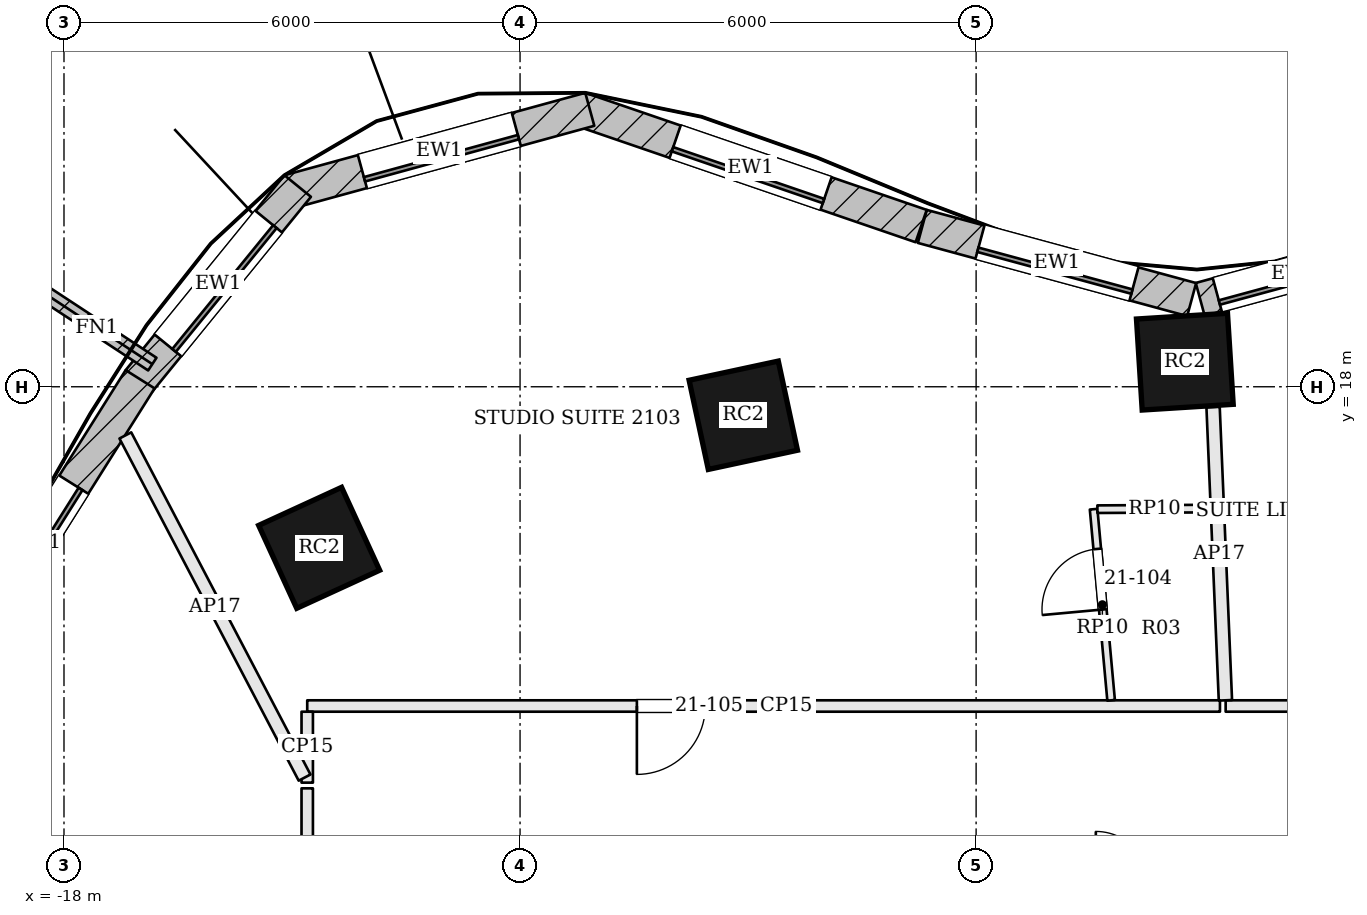
"""IFC4 building model, lengths in metres.
Left out: names, types, materials, properties, quantities, classifications, styles, units other than length and angle.
Written with IfcOpenShell. Run it as: python <this file> out.ifc"""

import sys

from ifc_helpers import new_model, si_unit, direction, frame, frame_2d, origin, origin_2d, place, context, subcontext, project, spatial, rectangle, extrude, element, fill, save


model = new_model("IFC4")
c1 = context("Model", 3, precision=1e-05, world=origin(), true_north=direction((0.0, 1.0)))
c2 = subcontext(c1, "Body", "Model", "MODEL_VIEW")
j1 = project(units=[si_unit("LENGTHUNIT", "METRE"), si_unit("PLANEANGLEUNIT", "RADIAN")], contexts=[c1])
p1 = place(None, origin())
s1 = spatial("IfcSite", under=j1, at=p1, CompositionType="ELEMENT")
p2 = place(p1, origin())
s2 = spatial("IfcBuilding", under=s1, at=p2, CompositionType="ELEMENT")
p3 = place(p2, frame((0.0, 0.0, 92.4)))
s3 = spatial("IfcBuildingStorey", under=s2, at=p3, CompositionType="ELEMENT", Elevation=92.4)
for number, where, z_axis, x_axis in (
    (1, (-3.254, 18.33, 0.0), (0.0, 0.0, 1.0), (-0.998, -0.063, 0.0)),
    (2, (-9.063, 17.625, 0.0), (0.0, 0.0, 1.0), (-0.978, -0.21, 0.0)),
    (3, (-14.643, 15.881, 0.0), (0.0, 0.0, 1.0), (-0.909, -0.417, 0.0)),
):
    element("IfcColumn", number, at=place(p3, frame(where, z_axis=z_axis, x_axis=x_axis)), inside=s3, PredefinedType="COLUMN", context=c2, shape_type="SweptSolid", body=[
        extrude(rectangle(XDim=1.2, YDim=1.2, at=origin_2d()), origin(), (0.0, 0.0, 1.0), 3.6),
    ])
p4 = place(p3, frame((-0.576, 19.821, 0.0), z_axis=(0.0, 0.0, 1.0), x_axis=(-0.965009398019, -0.262215296532, 0.0)))
e4 = element("IfcWall", 4, at=p4, inside=s3, PredefinedType="SOLIDWALL", context=c2, shape_type="SweptSolid", body=[
    extrude(rectangle(XDim=2.565, YDim=0.45, at=frame_2d((1.283, 0.0))), origin(), (0.0, 0.0, 1.0), 3.4),
])
p5 = place(p4, frame((0.233, 0.0, 0.9)))
e5 = element("IfcOpeningElement", 5, at=p5, cuts=e4, PredefinedType="OPENING", context=c2, shape_type="SweptSolid", body=[
    extrude(rectangle(XDim=2.1, YDim=2.0, at=frame_2d((1.05, 1.0))), frame((0.0, 0.235, 0.0), z_axis=(0.0, -1.0, 0.0), x_axis=(1.0, 0.0, 0.0)), (0.0, 0.0, 1.0), 0.47),
])
p6 = place(p3, frame((-3.164, 19.147, 0.0), z_axis=(0.0, 0.0, 1.0), x_axis=(-0.965039479998, 0.262104563191, 0.0)))
e6 = element("IfcWall", 6, at=p6, inside=s3, PredefinedType="SOLIDWALL", context=c2, shape_type="SweptSolid", body=[
    extrude(rectangle(XDim=3.672, YDim=0.45, at=frame_2d((1.836, 0.0))), origin(), (0.0, 0.0, 1.0), 3.4),
])
p7 = place(p6, frame((0.786, 0.0, 0.9)))
e7 = element("IfcOpeningElement", 7, at=p7, cuts=e6, PredefinedType="OPENING", context=c2, shape_type="SweptSolid", body=[
    extrude(rectangle(XDim=2.1, YDim=2.0, at=frame_2d((1.05, 1.0))), frame((0.0, 0.235, 0.0), z_axis=(0.0, -1.0, 0.0), x_axis=(1.0, 0.0, 0.0)), (0.0, 0.0, 1.0), 0.47),
])
p8 = place(p3, frame((-6.723, 20.114, 0.0), z_axis=(0.0, 0.0, 1.0), x_axis=(-0.945947299026, 0.324320377815, 0.0)))
e8 = element("IfcWall", 8, at=p8, inside=s3, PredefinedType="SOLIDWALL", context=c2, shape_type="SweptSolid", body=[
    extrude(rectangle(XDim=4.745, YDim=0.45, at=frame_2d((2.372, 0.0))), origin(), (0.0, 0.0, 1.0), 3.4),
])
p9 = place(p8, frame((1.322, 0.0, 0.9)))
e9 = element("IfcOpeningElement", 9, at=p9, cuts=e8, PredefinedType="OPENING", context=c2, shape_type="SweptSolid", body=[
    extrude(rectangle(XDim=2.1, YDim=2.0, at=frame_2d((1.05, 1.0))), frame((0.0, 0.235, 0.0), z_axis=(0.0, -1.0, 0.0), x_axis=(1.0, 0.0, 0.0)), (0.0, 0.0, 1.0), 0.47),
])
p10 = place(p3, frame((-11.083, 21.65, 0.0), z_axis=(0.0, 0.0, 1.0), x_axis=(-0.964483204983, -0.264144179011, 0.0)))
e10 = element("IfcWall", 10, at=p10, inside=s3, PredefinedType="SOLIDWALL", context=c2, shape_type="SweptSolid", body=[
    extrude(rectangle(XDim=4.104, YDim=0.45, at=frame_2d((2.052, 0.0))), origin(), (0.0, 0.0, 1.0), 3.4),
])
p11 = place(p10, frame((1.002, 0.0, 0.9)))
e11 = element("IfcOpeningElement", 11, at=p11, cuts=e10, PredefinedType="OPENING", context=c2, shape_type="SweptSolid", body=[
    extrude(rectangle(XDim=2.1, YDim=2.0, at=frame_2d((1.05, 1.0))), frame((0.0, 0.235, 0.0), z_axis=(0.0, -1.0, 0.0), x_axis=(1.0, 0.0, 0.0)), (0.0, 0.0, 1.0), 0.47),
])
p12 = place(p3, frame((-14.926, 20.641, 0.0), z_axis=(0.0, 0.0, 1.0), x_axis=(-0.631548074669, -0.775336720001, 0.0)))
e12 = element("IfcWall", 12, at=p12, inside=s3, PredefinedType="SOLIDWALL", context=c2, shape_type="SweptSolid", body=[
    extrude(rectangle(XDim=3.308, YDim=0.45, at=frame_2d((1.654, 0.0))), origin(), (0.0, 0.0, 1.0), 3.4),
])
p13 = place(p12, frame((0.604, 0.0, 0.9)))
e13 = element("IfcOpeningElement", 13, at=p13, cuts=e12, PredefinedType="OPENING", context=c2, shape_type="SweptSolid", body=[
    extrude(rectangle(XDim=2.1, YDim=2.0, at=frame_2d((1.05, 1.0))), frame((0.0, 0.235, 0.0), z_axis=(0.0, -1.0, 0.0), x_axis=(1.0, 0.0, 0.0)), (0.0, 0.0, 1.0), 0.47),
])
p14 = place(p3, frame((-16.998, 18.099, 0.0), z_axis=(0.0, 0.0, 1.0), x_axis=(-0.532745661304, -0.846275404559, 0.0)))
e14 = element("IfcWall", 14, at=p14, inside=s3, PredefinedType="SOLIDWALL", context=c2, shape_type="SweptSolid", body=[
    extrude(rectangle(XDim=5.076, YDim=0.45, at=frame_2d((2.538, 0.0))), origin(), (0.0, 0.0, 1.0), 3.4),
])
p15 = place(p14, frame((1.638, 0.0, 0.9)))
e15 = element("IfcOpeningElement", 15, at=p15, cuts=e14, PredefinedType="OPENING", context=c2, shape_type="SweptSolid", body=[
    extrude(rectangle(XDim=1.8, YDim=2.0, at=frame_2d((0.9, 1.0))), frame((0.0, 0.235, 0.0), z_axis=(0.0, -1.0, 0.0), x_axis=(1.0, 0.0, 0.0)), (0.0, 0.0, 1.0), 0.47),
])
p16 = place(p3, frame((-16.838, 18.298, 0.0), z_axis=(0.0, 0.0, 1.0), x_axis=(-0.835871900419, 0.548924554097, 0.0)))
e16 = element("IfcWall", 16, at=p16, inside=s3, PredefinedType="SOLIDWALL", context=c2, shape_type="SweptSolid", body=[
    extrude(rectangle(XDim=1.75, YDim=0.2, at=frame_2d((0.875, 0.0))), origin(), (0.0, 0.0, 1.0), 3.4),
])
p17 = place(p3, frame((8.911, 13.8, 0.0), z_axis=(0.0, 0.0, 1.0), x_axis=(-1.0, 0.0, 0.0)))
e17 = element("IfcWall", 17, at=p17, inside=s3, PredefinedType="PARTITIONING", context=c2, shape_type="SweptSolid", body=[
    extrude(rectangle(XDim=11.628, YDim=0.15, at=frame_2d((5.814, 0.0))), origin(), (0.0, 0.0, 1.0), 2.784),
])
p18 = place(p17, frame((9.669, 0.0, 0.0)))
e18 = element("IfcOpeningElement", 18, at=p18, cuts=e17, PredefinedType="OPENING", context=c2, shape_type="SweptSolid", body=[
    extrude(rectangle(XDim=1.0, YDim=2.1, at=frame_2d((0.5, 1.05))), frame((0.0, 0.085, 0.0), z_axis=(0.0, -1.0, 0.0), x_axis=(1.0, 0.0, 0.0)), (0.0, 0.0, 1.0), 0.17),
])
p19 = place(p3, frame((-2.882, 17.732, 0.0), z_axis=(0.0, 0.0, 1.0), x_axis=(0.04199090748, -0.999117992876, 0.0)))
e19 = element("IfcWall", 19, at=p19, inside=s3, PredefinedType="PARTITIONING", context=c2, shape_type="SweptSolid", body=[
    extrude(rectangle(XDim=3.861, YDim=0.175, at=frame_2d((1.93, 0.0))), origin(), (0.0, 0.0, 1.0), 2.784),
])
p20 = place(p3, frame((-2.792, 13.8, 0.0), z_axis=(0.0, 0.0, 1.0), x_axis=(-1.0, 0.0, 0.0)))
e20 = element("IfcWall", 20, at=p20, inside=s3, PredefinedType="PARTITIONING", context=c2, shape_type="SweptSolid", body=[
    extrude(rectangle(XDim=12.008, YDim=0.15, at=frame_2d((6.004, 0.0))), origin(), (0.0, 0.0, 1.0), 2.784),
])
p21 = place(p20, frame((6.771, 0.0, 0.0)))
e21 = element("IfcOpeningElement", 21, at=p21, cuts=e20, PredefinedType="OPENING", context=c2, shape_type="SweptSolid", body=[
    extrude(rectangle(XDim=0.9, YDim=2.4, at=frame_2d((0.45, 1.2))), frame((0.0, 0.085, 0.0), z_axis=(0.0, -1.0, 0.0), x_axis=(1.0, 0.0, 0.0)), (0.0, 0.0, 1.0), 0.17),
])
p22 = place(p3, frame((-14.8, 13.725, 0.0), z_axis=(0.0, 0.0, 1.0), x_axis=(0.0, -1.0, 0.0)))
e22 = element("IfcWall", 22, at=p22, inside=s3, PredefinedType="PARTITIONING", context=c2, shape_type="SweptSolid", body=[
    extrude(rectangle(XDim=0.933, YDim=0.15, at=frame_2d((0.467, 0.0))), origin(), (0.0, 0.0, 1.0), 2.784),
])
p23 = place(p3, frame((-17.193, 17.36, 0.0), z_axis=(0.0, 0.0, 1.0), x_axis=(0.46402494572, -0.885822132118, 0.0)))
e23 = element("IfcWall", 23, at=p23, inside=s3, PredefinedType="PARTITIONING", context=c2, shape_type="SweptSolid", body=[
    extrude(rectangle(XDim=5.082, YDim=0.175, at=frame_2d((2.541, 0.0))), origin(), (0.0, 0.0, 1.0), 2.784),
])
p24 = place(p3, frame((-14.8, 12.717, 0.0), z_axis=(0.0, 0.0, 1.0), x_axis=(0.0, -1.0, 0.0)))
e24 = element("IfcWall", 24, at=p24, inside=s3, PredefinedType="PARTITIONING", context=c2, shape_type="SweptSolid", body=[
    extrude(rectangle(XDim=2.22, YDim=0.15, at=frame_2d((1.11, 0.0))), origin(), (0.0, 0.0, 1.0), 2.784),
])
p25 = place(p3, frame((-4.224, 13.875, 0.0), z_axis=(0.0, 0.0, 1.0), x_axis=(-0.09127675815, 0.995825563752, 0.0)))
e25 = element("IfcWall", 25, at=p25, inside=s3, PredefinedType="PARTITIONING", context=c2, shape_type="SweptSolid", body=[
    extrude(rectangle(XDim=2.525, YDim=0.1, at=frame_2d((1.262, 0.0))), origin(), (0.0, 0.0, 1.0), 2.884),
])
p26 = place(p25, frame((1.2, 0.0, 0.0)))
e26 = element("IfcOpeningElement", 26, at=p26, cuts=e25, PredefinedType="OPENING", context=c2, shape_type="SweptSolid", body=[
    extrude(rectangle(XDim=0.8, YDim=2.1, at=frame_2d((0.4, 1.05))), frame((0.0, 0.06, 0.0), z_axis=(0.0, -1.0, 0.0), x_axis=(1.0, 0.0, 0.0)), (0.0, 0.0, 1.0), 0.12),
])
p27 = place(p3, frame((-4.404, 16.389, 0.0), z_axis=(0.0, 0.0, 1.0), x_axis=(0.999986489733, 0.005198110408, 0.0)))
e27 = element("IfcWall", 27, at=p27, inside=s3, PredefinedType="PARTITIONING", context=c2, shape_type="SweptSolid", body=[
    extrude(rectangle(XDim=1.503, YDim=0.1, at=frame_2d((0.751, 0.0))), origin(), (0.0, 0.0, 1.0), 2.884),
])
p28 = place(p5, origin())
e28 = element("IfcWindow", 28, at=p28, inside=s3, PartitioningType="SINGLE_PANEL", PredefinedType="WINDOW", context=c2, shape_type="SweptSolid", body=[
    extrude(rectangle(XDim=2.1, YDim=2.0, at=frame_2d((1.05, 1.0))), frame((0.0, 0.135, 0.0), z_axis=(0.0, -1.0, 0.0), x_axis=(1.0, 0.0, 0.0)), (0.0, 0.0, 1.0), 0.06),
])
fill(e5, e28)
p29 = place(p7, origin())
e29 = element("IfcWindow", 29, at=p29, inside=s3, PartitioningType="SINGLE_PANEL", PredefinedType="WINDOW", context=c2, shape_type="SweptSolid", body=[
    extrude(rectangle(XDim=2.1, YDim=2.0, at=frame_2d((1.05, 1.0))), frame((0.0, 0.135, 0.0), z_axis=(0.0, -1.0, 0.0), x_axis=(1.0, 0.0, 0.0)), (0.0, 0.0, 1.0), 0.06),
])
fill(e7, e29)
p30 = place(p9, origin())
e30 = element("IfcWindow", 30, at=p30, inside=s3, PartitioningType="SINGLE_PANEL", PredefinedType="WINDOW", context=c2, shape_type="SweptSolid", body=[
    extrude(rectangle(XDim=2.1, YDim=2.0, at=frame_2d((1.05, 1.0))), frame((0.0, 0.135, 0.0), z_axis=(0.0, -1.0, 0.0), x_axis=(1.0, 0.0, 0.0)), (0.0, 0.0, 1.0), 0.06),
])
fill(e9, e30)
p31 = place(p11, origin())
e31 = element("IfcWindow", 31, at=p31, inside=s3, PartitioningType="SINGLE_PANEL", PredefinedType="WINDOW", context=c2, shape_type="SweptSolid", body=[
    extrude(rectangle(XDim=2.1, YDim=2.0, at=frame_2d((1.05, 1.0))), frame((0.0, 0.135, 0.0), z_axis=(0.0, -1.0, 0.0), x_axis=(1.0, 0.0, 0.0)), (0.0, 0.0, 1.0), 0.06),
])
fill(e11, e31)
p32 = place(p13, origin())
e32 = element("IfcWindow", 32, at=p32, inside=s3, PartitioningType="SINGLE_PANEL", PredefinedType="WINDOW", context=c2, shape_type="SweptSolid", body=[
    extrude(rectangle(XDim=2.1, YDim=2.0, at=frame_2d((1.05, 1.0))), frame((0.0, 0.135, 0.0), z_axis=(0.0, -1.0, 0.0), x_axis=(1.0, 0.0, 0.0)), (0.0, 0.0, 1.0), 0.06),
])
fill(e13, e32)
p33 = place(p15, origin())
e33 = element("IfcWindow", 33, at=p33, inside=s3, PartitioningType="SINGLE_PANEL", PredefinedType="WINDOW", context=c2, shape_type="SweptSolid", body=[
    extrude(rectangle(XDim=1.8, YDim=2.0, at=frame_2d((0.9, 1.0))), frame((0.0, 0.135, 0.0), z_axis=(0.0, -1.0, 0.0), x_axis=(1.0, 0.0, 0.0)), (0.0, 0.0, 1.0), 0.06),
])
fill(e15, e33)
p34 = place(p26, origin())
e34 = element("IfcDoor", 34, at=p34, inside=s3, OperationType="SINGLE_SWING_LEFT", PredefinedType="DOOR", context=c2, shape_type="SweptSolid", body=[
    extrude(rectangle(XDim=0.8, YDim=2.1, at=frame_2d((0.4, 1.05))), frame((0.0, 0.025, 0.0), z_axis=(0.0, -1.0, 0.0), x_axis=(1.0, 0.0, 0.0)), (0.0, 0.0, 1.0), 0.05),
])
fill(e26, e34)
p35 = place(p21, origin())
e35 = element("IfcDoor", 35, at=p35, inside=s3, OperationType="SINGLE_SWING_RIGHT", PredefinedType="DOOR", context=c2, shape_type="SweptSolid", body=[
    extrude(rectangle(XDim=0.9, YDim=2.4, at=frame_2d((0.45, 1.2))), frame((0.0, 0.025, 0.0), z_axis=(0.0, -1.0, 0.0), x_axis=(1.0, 0.0, 0.0)), (0.0, 0.0, 1.0), 0.05),
])
fill(e21, e35)
save(model, sys.argv[1])
